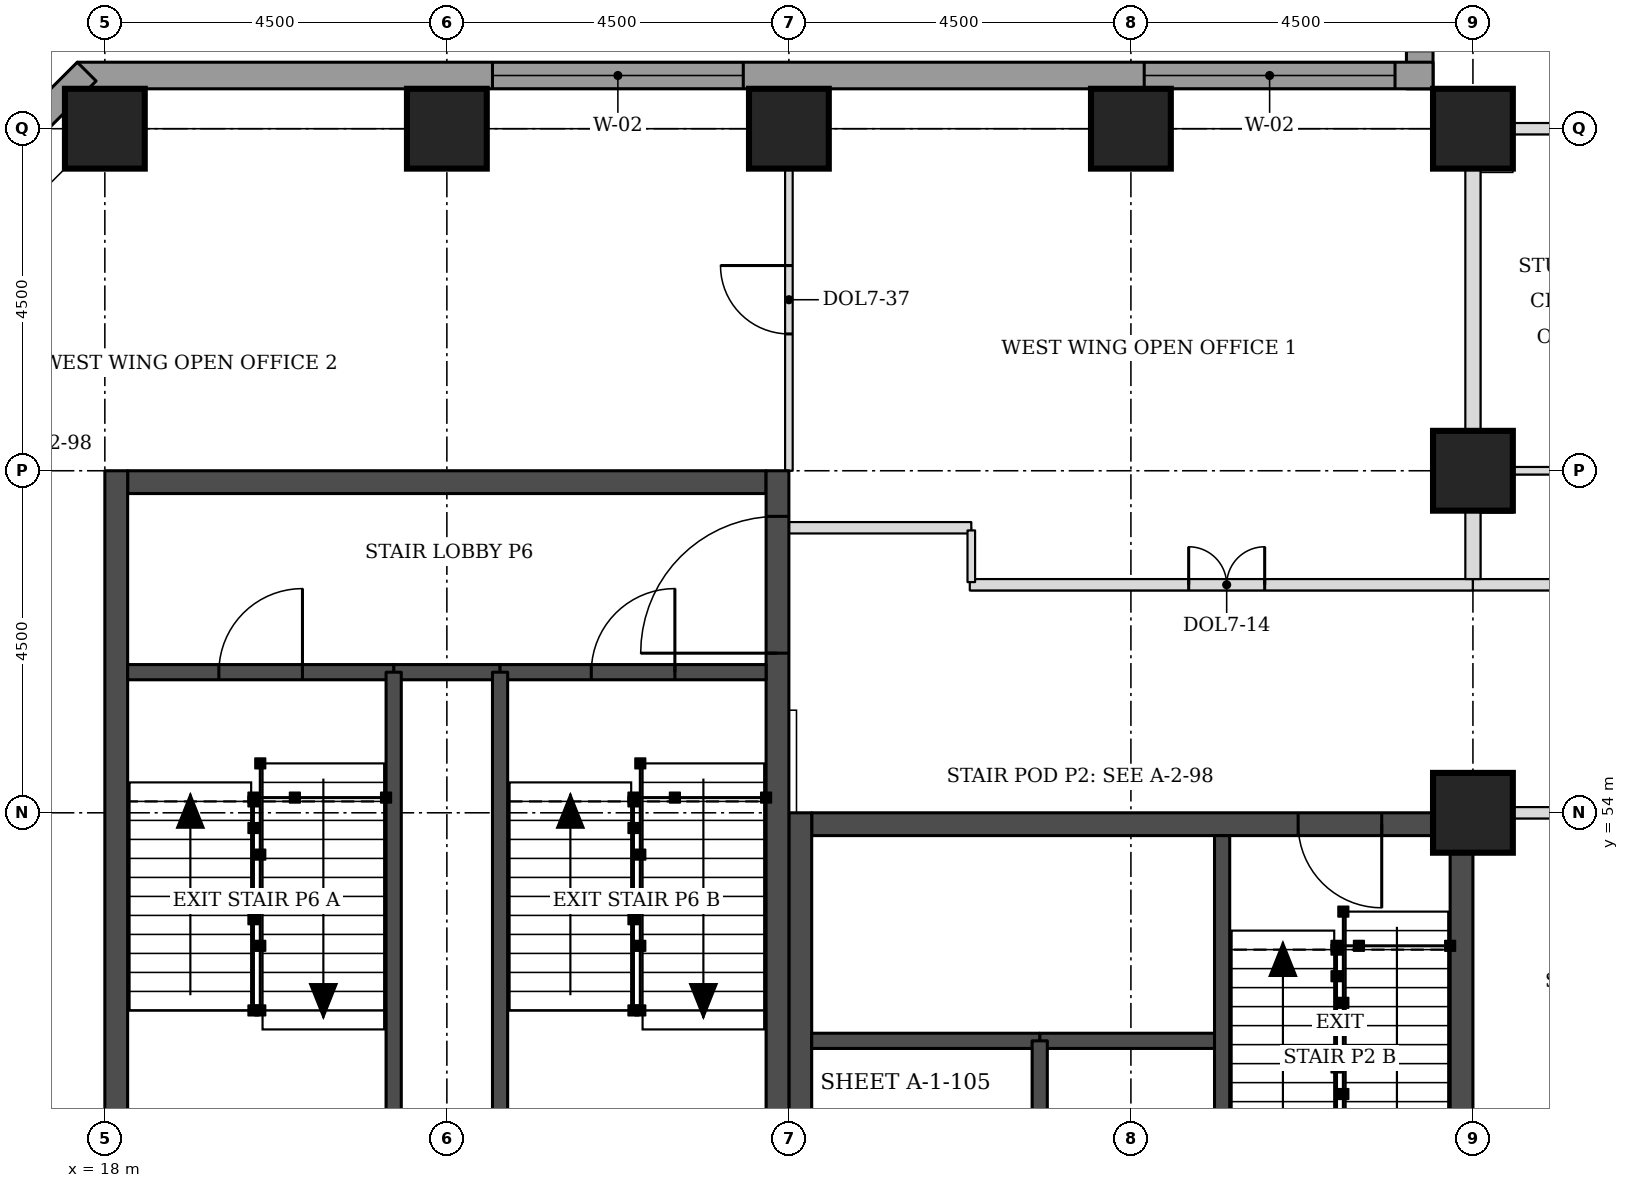
"""IFC4 building model, lengths in metres.
Left out: names, types, materials, properties, quantities, classifications, styles, units other than length and angle.
Written with IfcOpenShell. Run it as: python <this file> out.ifc"""

import sys

from ifc_helpers import new_model, si_unit, direction, frame, frame_2d, origin, origin_2d, place, context, subcontext, project, spatial, rectangle, extrude, element, fill, save


model = new_model("IFC4")
c1 = context("Model", 3, precision=1e-05, world=origin(), true_north=direction((0.0, 1.0)))
c2 = subcontext(c1, "Body", "Model", "MODEL_VIEW")
j1 = project(units=[si_unit("LENGTHUNIT", "METRE"), si_unit("PLANEANGLEUNIT", "RADIAN")], contexts=[c1])
p1 = place(None, origin())
s1 = spatial("IfcSite", under=j1, at=p1, CompositionType="ELEMENT")
p2 = place(p1, origin())
s2 = spatial("IfcBuilding", under=s1, at=p2, CompositionType="ELEMENT")
p3 = place(p2, frame((0.0, 0.0, 127.0)))
s3 = spatial("IfcBuildingStorey", under=s2, at=p3, CompositionType="ELEMENT", Elevation=127.0)
for number, where, z_axis, x_axis in (
    (1, (36.0, 54.0, 0.0), (0.0, 0.0, 1.0), (1.0, 0.0, 0.0)),
    (2, (36.0, 58.5, 0.0), (0.0, 0.0, 1.0), (1.0, 0.0, 0.0)),
    (3, (18.0, 63.0, 0.0), (0.0, 0.0, 1.0), (1.0, 0.0, 0.0)),
    (4, (22.5, 63.0, 0.0), (0.0, 0.0, 1.0), (1.0, 0.0, 0.0)),
    (5, (27.0, 63.0, 0.0), (0.0, 0.0, 1.0), (1.0, 0.0, 0.0)),
    (6, (31.5, 63.0, 0.0), (0.0, 0.0, 1.0), (1.0, 0.0, 0.0)),
    (7, (36.0, 63.0, 0.0), (0.0, 0.0, 1.0), (1.0, 0.0, 0.0)),
):
    element("IfcColumn", number, at=place(p3, frame(where, z_axis=z_axis, x_axis=x_axis)), inside=s3, PredefinedType="COLUMN", context=c2, shape_type="SweptSolid", body=[
        extrude(rectangle(XDim=1.05, YDim=1.05, at=origin_2d()), origin(), (0.0, 0.0, 1.0), 3.7),
    ])
p4 = place(p3, frame((27.3, 53.85, 0.0), z_axis=(0.0, 0.0, 1.0), x_axis=(1.0, 0.0, 0.0)))
e8 = element("IfcWall", 8, at=p4, inside=s3, PredefinedType="SHEAR", context=c2, shape_type="SweptSolid", body=[
    extrude(rectangle(XDim=8.4, YDim=0.3, at=frame_2d((4.2, 0.0))), origin(), (0.0, 0.0, 1.0), 3.7),
])
p5 = place(p4, frame((6.4, 0.0, 0.0)))
e9 = element("IfcOpeningElement", 9, at=p5, cuts=e8, PredefinedType="OPENING", context=c2, shape_type="SweptSolid", body=[
    extrude(rectangle(XDim=1.1, YDim=2.1, at=frame_2d((0.55, 1.05))), frame((0.0, 0.16, 0.0), z_axis=(0.0, -1.0, 0.0), x_axis=(1.0, 0.0, 0.0)), (0.0, 0.0, 1.0), 0.32),
])
p6 = place(p3, frame((27.15, 45.0, 0.0), z_axis=(0.0, 0.0, 1.0), x_axis=(0.0, 1.0, 0.0)))
e10 = element("IfcWall", 10, at=p6, inside=s3, PredefinedType="SHEAR", context=c2, shape_type="SweptSolid", body=[
    extrude(rectangle(XDim=9.0, YDim=0.3, at=frame_2d((4.5, 0.0))), origin(), (0.0, 0.0, 1.0), 3.7),
])
p7 = place(p6, frame((0.4, 0.0, 0.0)))
e11 = element("IfcOpeningElement", 11, at=p7, cuts=e10, PredefinedType="OPENING", context=c2, shape_type="SweptSolid", body=[
    extrude(rectangle(XDim=1.1, YDim=2.1, at=frame_2d((0.55, 1.05))), frame((0.0, 0.16, 0.0), z_axis=(0.0, -1.0, 0.0), x_axis=(1.0, 0.0, 0.0)), (0.0, 0.0, 1.0), 0.32),
])
p8 = place(p3, frame((35.85, 45.0, 0.0), z_axis=(0.0, 0.0, 1.0), x_axis=(0.0, 1.0, 0.0)))
e12 = element("IfcWall", 12, at=p8, inside=s3, PredefinedType="SHEAR", context=c2, shape_type="SweptSolid", body=[
    extrude(rectangle(XDim=9.0, YDim=0.3, at=frame_2d((4.5, 0.0))), origin(), (0.0, 0.0, 1.0), 3.7),
])
p9 = place(p3, frame((18.3, 58.35, 0.0), z_axis=(0.0, 0.0, 1.0), x_axis=(1.0, 0.0, 0.0)))
e13 = element("IfcWall", 13, at=p9, inside=s3, PredefinedType="SHEAR", context=c2, shape_type="SweptSolid", body=[
    extrude(rectangle(XDim=8.4, YDim=0.3, at=frame_2d((4.2, 0.0))), origin(), (0.0, 0.0, 1.0), 3.7),
])
p10 = place(p3, frame((18.15, 49.5, 0.0), z_axis=(0.0, 0.0, 1.0), x_axis=(0.0, 1.0, 0.0)))
e14 = element("IfcWall", 14, at=p10, inside=s3, PredefinedType="SHEAR", context=c2, shape_type="SweptSolid", body=[
    extrude(rectangle(XDim=9.0, YDim=0.3, at=frame_2d((4.5, 0.0))), origin(), (0.0, 0.0, 1.0), 3.7),
])
p11 = place(p3, frame((26.85, 49.5, 0.0), z_axis=(0.0, 0.0, 1.0), x_axis=(0.0, 1.0, 0.0)))
e15 = element("IfcWall", 15, at=p11, inside=s3, PredefinedType="SHEAR", context=c2, shape_type="SweptSolid", body=[
    extrude(rectangle(XDim=9.0, YDim=0.3, at=frame_2d((4.5, 0.0))), origin(), (0.0, 0.0, 1.0), 3.7),
])
p12 = place(p11, frame((6.6, 0.0, 0.0)))
e16 = element("IfcOpeningElement", 16, at=p12, cuts=e15, PredefinedType="OPENING", context=c2, shape_type="SweptSolid", body=[
    extrude(rectangle(XDim=1.8, YDim=2.1, at=frame_2d((0.9, 1.05))), frame((0.0, 0.16, 0.0), z_axis=(0.0, -1.0, 0.0), x_axis=(1.0, 0.0, 0.0)), (0.0, 0.0, 1.0), 0.32),
])
p13 = place(p3, frame((35.3, 76.862, 0.0), z_axis=(0.0, 0.0, 1.0), x_axis=(0.0, -1.0, 0.0)))
e17 = element("IfcWall", 17, at=p13, inside=s3, PredefinedType="STANDARD", context=c2, shape_type="SweptSolid", body=[
    extrude(rectangle(XDim=13.337, YDim=0.35, at=frame_2d((6.669, 0.0))), origin(), (0.0, 0.0, 1.0), 3.525),
])
p14 = place(p13, frame((9.537, 0.0, 0.9)))
e18 = element("IfcOpeningElement", 18, at=p14, cuts=e17, PredefinedType="OPENING", context=c2, shape_type="SweptSolid", body=[
    extrude(rectangle(XDim=3.3, YDim=1.9, at=frame_2d((1.65, 0.95))), frame((0.0, 0.185, 0.0), z_axis=(0.0, -1.0, 0.0), x_axis=(1.0, 0.0, 0.0)), (0.0, 0.0, 1.0), 0.37),
])
p15 = place(p3, frame((35.475, 63.7, 0.0), z_axis=(0.0, 0.0, 1.0), x_axis=(-1.0, 0.0, 0.0)))
e19 = element("IfcWall", 19, at=p15, inside=s3, PredefinedType="STANDARD", context=c2, shape_type="SweptSolid", body=[
    extrude(rectangle(XDim=17.837, YDim=0.35, at=frame_2d((8.919, 0.0))), origin(), (0.0, 0.0, 1.0), 3.525),
])
p16 = place(p15, frame((0.5, 0.0, 0.9)))
e20 = element("IfcOpeningElement", 20, at=p16, cuts=e19, PredefinedType="OPENING", context=c2, shape_type="SweptSolid", body=[
    extrude(rectangle(XDim=3.3, YDim=1.9, at=frame_2d((1.65, 0.95))), frame((0.0, 0.185, 0.0), z_axis=(0.0, -1.0, 0.0), x_axis=(1.0, 0.0, 0.0)), (0.0, 0.0, 1.0), 0.37),
])
p17 = place(p15, frame((9.075, 0.0, 0.9)))
e21 = element("IfcOpeningElement", 21, at=p17, cuts=e19, PredefinedType="OPENING", context=c2, shape_type="SweptSolid", body=[
    extrude(rectangle(XDim=3.3, YDim=1.9, at=frame_2d((1.65, 0.95))), frame((0.0, 0.185, 0.0), z_axis=(0.0, -1.0, 0.0), x_axis=(1.0, 0.0, 0.0)), (0.0, 0.0, 1.0), 0.37),
])
p18 = place(p3, frame((17.761, 63.751, 0.0), z_axis=(0.0, 0.0, 1.0), x_axis=(-0.707106781187, -0.707106781187, 0.0)))
e22 = element("IfcWall", 22, at=p18, inside=s3, PredefinedType="STANDARD", context=c2, shape_type="SweptSolid", body=[
    extrude(rectangle(XDim=7.089, YDim=0.35, at=frame_2d((3.544, 0.0))), origin(), (0.0, 0.0, 1.0), 3.525),
])
p19 = place(p18, frame((1.894, 0.0, 0.9)))
e23 = element("IfcOpeningElement", 23, at=p19, cuts=e22, PredefinedType="OPENING", context=c2, shape_type="SweptSolid", body=[
    extrude(rectangle(XDim=3.3, YDim=1.9, at=frame_2d((1.65, 0.95))), frame((0.0, 0.185, 0.0), z_axis=(0.0, -1.0, 0.0), x_axis=(1.0, 0.0, 0.0)), (0.0, 0.0, 1.0), 0.37),
])
p20 = place(p3, frame((36.525, 54.0, 0.0), z_axis=(0.0, 0.0, 1.0), x_axis=(1.0, 0.0, 0.0)))
e24 = element("IfcWall", 24, at=p20, inside=s3, PredefinedType="PARTITIONING", context=c2, shape_type="SweptSolid", body=[
    extrude(rectangle(XDim=5.55, YDim=0.15, at=frame_2d((2.775, 0.0))), origin(), (0.0, 0.0, 1.0), 3.55),
])
p21 = place(p3, frame((29.38, 57.0, 0.0), z_axis=(0.0, 0.0, 1.0), x_axis=(1.0, 0.0, 0.0)))
e25 = element("IfcWall", 25, at=p21, inside=s3, PredefinedType="PARTITIONING", context=c2, shape_type="SweptSolid", body=[
    extrude(rectangle(XDim=6.62, YDim=0.15, at=frame_2d((3.31, 0.0))), origin(), (0.0, 0.0, 1.0), 3.55),
])
p22 = place(p21, frame((2.88, 0.0, 0.0)))
e26 = element("IfcOpeningElement", 26, at=p22, cuts=e25, PredefinedType="OPENING", context=c2, shape_type="SweptSolid", body=[
    extrude(rectangle(XDim=1.0, YDim=2.1, at=frame_2d((0.5, 1.05))), frame((0.0, 0.085, 0.0), z_axis=(0.0, -1.0, 0.0), x_axis=(1.0, 0.0, 0.0)), (0.0, 0.0, 1.0), 0.17),
])
p23 = place(p3, frame((36.0, 57.0, 0.0), z_axis=(0.0, 0.0, 1.0), x_axis=(1.0, 0.0, 0.0)))
e27 = element("IfcWall", 27, at=p23, inside=s3, PredefinedType="PARTITIONING", context=c2, shape_type="SweptSolid", body=[
    extrude(rectangle(XDim=6.075, YDim=0.15, at=frame_2d((3.038, 0.0))), origin(), (0.0, 0.0, 1.0), 3.55),
])
p24 = place(p23, frame((2.55, 0.0, 0.0)))
e28 = element("IfcOpeningElement", 28, at=p24, cuts=e27, PredefinedType="OPENING", context=c2, shape_type="SweptSolid", body=[
    extrude(rectangle(XDim=1.0, YDim=2.1, at=frame_2d((0.5, 1.05))), frame((0.0, 0.085, 0.0), z_axis=(0.0, -1.0, 0.0), x_axis=(1.0, 0.0, 0.0)), (0.0, 0.0, 1.0), 0.17),
])
p25 = place(p3, frame((36.525, 58.5, 0.0), z_axis=(0.0, 0.0, 1.0), x_axis=(1.0, 0.0, 0.0)))
e29 = element("IfcWall", 29, at=p25, inside=s3, PredefinedType="PARTITIONING", context=c2, shape_type="SweptSolid", body=[
    extrude(rectangle(XDim=2.525, YDim=0.1, at=frame_2d((1.263, 0.0))), origin(), (0.0, 0.0, 1.0), 3.55),
])
p26 = place(p25, frame((0.8, 0.0, 0.0)))
e30 = element("IfcOpeningElement", 30, at=p26, cuts=e29, PredefinedType="OPENING", context=c2, shape_type="SweptSolid", body=[
    extrude(rectangle(XDim=0.9, YDim=2.1, at=frame_2d((0.45, 1.05))), frame((0.0, 0.06, 0.0), z_axis=(0.0, -1.0, 0.0), x_axis=(1.0, 0.0, 0.0)), (0.0, 0.0, 1.0), 0.12),
])
p27 = place(p3, frame((36.525, 63.0, 0.0), z_axis=(0.0, 0.0, 1.0), x_axis=(1.0, 0.0, 0.0)))
e31 = element("IfcWall", 31, at=p27, inside=s3, PredefinedType="PARTITIONING", context=c2, shape_type="SweptSolid", body=[
    extrude(rectangle(XDim=2.4, YDim=0.15, at=frame_2d((1.2, 0.0))), origin(), (0.0, 0.0, 1.0), 3.55),
])
p28 = place(p3, frame((36.0, 57.075, 0.0), z_axis=(0.0, 0.0, 1.0), x_axis=(0.0, 1.0, 0.0)))
e32 = element("IfcWall", 32, at=p28, inside=s3, PredefinedType="PARTITIONING", context=c2, shape_type="SweptSolid", body=[
    extrude(rectangle(XDim=0.9, YDim=0.2, at=frame_2d((0.45, 0.0))), origin(), (0.0, 0.0, 1.0), 2.8),
])
p29 = place(p3, frame((36.0, 58.995, 0.0), z_axis=(0.0, 0.0, 1.0), x_axis=(0.0, 1.0, 0.0)))
e33 = element("IfcWall", 33, at=p29, inside=s3, PredefinedType="PARTITIONING", context=c2, shape_type="SweptSolid", body=[
    extrude(rectangle(XDim=3.48, YDim=0.2, at=frame_2d((1.74, 0.0))), origin(), (0.0, 0.0, 1.0), 2.8),
])
p30 = place(p3, frame((27.0, 63.0, 0.0), z_axis=(0.0, 0.0, 1.0), x_axis=(0.0, -1.0, 0.0)))
e34 = element("IfcWall", 34, at=p30, inside=s3, PredefinedType="PARTITIONING", context=c2, shape_type="SweptSolid", body=[
    extrude(rectangle(XDim=4.5, YDim=0.1, at=frame_2d((2.25, 0.0))), origin(), (0.0, 0.0, 1.0), 3.55),
])
p31 = place(p30, frame((1.8, 0.0, 0.0)))
e35 = element("IfcOpeningElement", 35, at=p31, cuts=e34, PredefinedType="OPENING", context=c2, shape_type="SweptSolid", body=[
    extrude(rectangle(XDim=0.9, YDim=2.1, at=frame_2d((0.45, 1.05))), frame((0.0, 0.06, 0.0), z_axis=(0.0, -1.0, 0.0), x_axis=(1.0, 0.0, 0.0)), (0.0, 0.0, 1.0), 0.12),
])
p32 = place(p3, frame((27.0, 57.75, 0.0), z_axis=(0.0, 0.0, 1.0), x_axis=(1.0, 0.0, 0.0)))
e36 = element("IfcWall", 36, at=p32, inside=s3, PredefinedType="PARTITIONING", context=c2, shape_type="SweptSolid", body=[
    extrude(rectangle(XDim=2.4, YDim=0.15, at=frame_2d((1.2, 0.0))), origin(), (0.0, 0.0, 1.0), 3.55),
])
p33 = place(p3, frame((29.4, 57.715, 0.0), z_axis=(0.0, 0.0, 1.0), x_axis=(0.0, -1.0, 0.0)))
e37 = element("IfcWall", 37, at=p33, inside=s3, PredefinedType="PARTITIONING", context=c2, shape_type="SweptSolid", body=[
    extrude(rectangle(XDim=0.68, YDim=0.1, at=frame_2d((0.34, 0.0))), origin(), (0.0, 0.0, 1.0), 3.55),
])
p34 = place(p3, frame((30.3, 51.0, 0.0), z_axis=(0.0, 0.0, 1.0), x_axis=(1.0, 0.0, 0.0)))
e38 = element("IfcWall", 38, at=p34, inside=s3, PredefinedType="SOLIDWALL", context=c2, shape_type="SweptSolid", body=[
    extrude(rectangle(XDim=2.4, YDim=0.2, at=frame_2d((1.2, 0.0))), origin(), (0.0, 0.0, 1.0), 3.7),
])
p35 = place(p3, frame((27.3, 51.0, 0.0), z_axis=(0.0, 0.0, 1.0), x_axis=(1.0, 0.0, 0.0)))
e39 = element("IfcWall", 39, at=p35, inside=s3, PredefinedType="SOLIDWALL", context=c2, shape_type="SweptSolid", body=[
    extrude(rectangle(XDim=3.0, YDim=0.2, at=frame_2d((1.5, 0.0))), origin(), (0.0, 0.0, 1.0), 3.55),
])
for number, where, z_axis, x_axis in (
    (40, (30.3, 45.3, 0.0), (0.0, 0.0, 1.0), (0.0, 1.0, 0.0)),
    (41, (32.7, 48.0, 0.0), (0.0, 0.0, 1.0), (0.0, 1.0, 0.0)),
):
    element("IfcWall", number, at=place(p3, frame(where, z_axis=z_axis, x_axis=x_axis)), inside=s3, PredefinedType="SOLIDWALL", context=c2, shape_type="SweptSolid", body=[
        extrude(rectangle(XDim=5.7, YDim=0.2, at=frame_2d((2.85, 0.0))), origin(), (0.0, 0.0, 1.0), 3.55),
    ])
p36 = place(p3, frame((21.8, 55.85, 0.0), z_axis=(0.0, 0.0, 1.0), x_axis=(1.0, 0.0, 0.0)))
e42 = element("IfcWall", 42, at=p36, inside=s3, PredefinedType="SOLIDWALL", context=c2, shape_type="SweptSolid", body=[
    extrude(rectangle(XDim=1.4, YDim=0.2, at=frame_2d((0.7, 0.0))), origin(), (0.0, 0.0, 1.0), 3.55),
])
p37 = place(p3, frame((18.3, 55.85, 0.0), z_axis=(0.0, 0.0, 1.0), x_axis=(1.0, 0.0, 0.0)))
e43 = element("IfcWall", 43, at=p37, inside=s3, PredefinedType="SOLIDWALL", context=c2, shape_type="SweptSolid", body=[
    extrude(rectangle(XDim=3.5, YDim=0.2, at=frame_2d((1.75, 0.0))), origin(), (0.0, 0.0, 1.0), 3.55),
])
p38 = place(p37, frame((1.2, 0.0, 0.0)))
e44 = element("IfcOpeningElement", 44, at=p38, cuts=e43, PredefinedType="OPENING", context=c2, shape_type="SweptSolid", body=[
    extrude(rectangle(XDim=1.1, YDim=2.1, at=frame_2d((0.55, 1.05))), frame((0.0, 0.11, 0.0), z_axis=(0.0, -1.0, 0.0), x_axis=(1.0, 0.0, 0.0)), (0.0, 0.0, 1.0), 0.22),
])
p39 = place(p3, frame((23.2, 55.85, 0.0), z_axis=(0.0, 0.0, 1.0), x_axis=(1.0, 0.0, 0.0)))
e45 = element("IfcWall", 45, at=p39, inside=s3, PredefinedType="SOLIDWALL", context=c2, shape_type="SweptSolid", body=[
    extrude(rectangle(XDim=3.5, YDim=0.2, at=frame_2d((1.75, 0.0))), origin(), (0.0, 0.0, 1.0), 3.55),
])
p40 = place(p39, frame((1.2, 0.0, 0.0)))
e46 = element("IfcOpeningElement", 46, at=p40, cuts=e45, PredefinedType="OPENING", context=c2, shape_type="SweptSolid", body=[
    extrude(rectangle(XDim=1.1, YDim=2.1, at=frame_2d((0.55, 1.05))), frame((0.0, 0.11, 0.0), z_axis=(0.0, -1.0, 0.0), x_axis=(1.0, 0.0, 0.0)), (0.0, 0.0, 1.0), 0.22),
])
for number, where, z_axis, x_axis in (
    (47, (21.8, 49.8, 0.0), (0.0, 0.0, 1.0), (0.0, 1.0, 0.0)),
    (48, (23.2, 49.8, 0.0), (0.0, 0.0, 1.0), (0.0, 1.0, 0.0)),
):
    element("IfcWall", number, at=place(p3, frame(where, z_axis=z_axis, x_axis=x_axis)), inside=s3, PredefinedType="SOLIDWALL", context=c2, shape_type="SweptSolid", body=[
        extrude(rectangle(XDim=6.05, YDim=0.2, at=frame_2d((3.025, 0.0))), origin(), (0.0, 0.0, 1.0), 3.55),
    ])
p41 = place(p16, origin())
e49 = element("IfcWindow", 49, at=p41, inside=s3, PartitioningType="SINGLE_PANEL", PredefinedType="WINDOW", context=c2, shape_type="SweptSolid", body=[
    extrude(rectangle(XDim=3.3, YDim=1.9, at=frame_2d((1.65, 0.95))), frame((0.0, 0.085, 0.0), z_axis=(0.0, -1.0, 0.0), x_axis=(1.0, 0.0, 0.0)), (0.0, 0.0, 1.0), 0.06),
])
fill(e20, e49)
p42 = place(p17, origin())
e50 = element("IfcWindow", 50, at=p42, inside=s3, PartitioningType="SINGLE_PANEL", PredefinedType="WINDOW", context=c2, shape_type="SweptSolid", body=[
    extrude(rectangle(XDim=3.3, YDim=1.9, at=frame_2d((1.65, 0.95))), frame((0.0, 0.085, 0.0), z_axis=(0.0, -1.0, 0.0), x_axis=(1.0, 0.0, 0.0)), (0.0, 0.0, 1.0), 0.06),
])
fill(e21, e50)
p43 = place(p22, origin())
e51 = element("IfcDoor", 51, at=p43, inside=s3, OperationType="DOUBLE_DOOR_SINGLE_SWING", PredefinedType="DOOR", context=c2, shape_type="SweptSolid", body=[
    extrude(rectangle(XDim=1.0, YDim=2.1, at=frame_2d((0.5, 1.05))), frame((0.0, 0.025, 0.0), z_axis=(0.0, -1.0, 0.0), x_axis=(1.0, 0.0, 0.0)), (0.0, 0.0, 1.0), 0.05),
])
fill(e26, e51)
p44 = place(p31, frame((0.9, 0.0, 0.0), z_axis=(0.0, 0.0, 1.0), x_axis=(-1.0, 0.0, 0.0)))
e52 = element("IfcDoor", 52, at=p44, inside=s3, OperationType="SINGLE_SWING_RIGHT", PredefinedType="DOOR", context=c2, shape_type="SweptSolid", body=[
    extrude(rectangle(XDim=0.9, YDim=2.1, at=frame_2d((0.45, 1.05))), frame((0.0, 0.025, 0.0), z_axis=(0.0, -1.0, 0.0), x_axis=(1.0, 0.0, 0.0)), (0.0, 0.0, 1.0), 0.05),
])
fill(e35, e52)
p45 = place(p5, frame((1.1, 0.0, 0.0), z_axis=(0.0, 0.0, 1.0), x_axis=(-1.0, 0.0, 0.0)))
e53 = element("IfcDoor", 53, at=p45, inside=s3, OperationType="SINGLE_SWING_LEFT", PredefinedType="DOOR", context=c2, shape_type="SweptSolid", body=[
    extrude(rectangle(XDim=1.1, YDim=2.1, at=frame_2d((0.55, 1.05))), frame((0.0, 0.025, 0.0), z_axis=(0.0, -1.0, 0.0), x_axis=(1.0, 0.0, 0.0)), (0.0, 0.0, 1.0), 0.05),
])
fill(e9, e53)
p46 = place(p38, origin())
e54 = element("IfcDoor", 54, at=p46, inside=s3, OperationType="SINGLE_SWING_RIGHT", PredefinedType="DOOR", context=c2, shape_type="SweptSolid", body=[
    extrude(rectangle(XDim=1.1, YDim=2.1, at=frame_2d((0.55, 1.05))), frame((0.0, 0.025, 0.0), z_axis=(0.0, -1.0, 0.0), x_axis=(1.0, 0.0, 0.0)), (0.0, 0.0, 1.0), 0.05),
])
fill(e44, e54)
p47 = place(p40, origin())
e55 = element("IfcDoor", 55, at=p47, inside=s3, OperationType="SINGLE_SWING_RIGHT", PredefinedType="DOOR", context=c2, shape_type="SweptSolid", body=[
    extrude(rectangle(XDim=1.1, YDim=2.1, at=frame_2d((0.55, 1.05))), frame((0.0, 0.025, 0.0), z_axis=(0.0, -1.0, 0.0), x_axis=(1.0, 0.0, 0.0)), (0.0, 0.0, 1.0), 0.05),
])
fill(e46, e55)
p48 = place(p12, origin())
e56 = element("IfcDoor", 56, at=p48, inside=s3, OperationType="SINGLE_SWING_LEFT", PredefinedType="DOOR", context=c2, shape_type="SweptSolid", body=[
    extrude(rectangle(XDim=1.8, YDim=2.1, at=frame_2d((0.9, 1.05))), frame((0.0, 0.025, 0.0), z_axis=(0.0, -1.0, 0.0), x_axis=(1.0, 0.0, 0.0)), (0.0, 0.0, 1.0), 0.05),
])
fill(e16, e56)
save(model, sys.argv[1])
